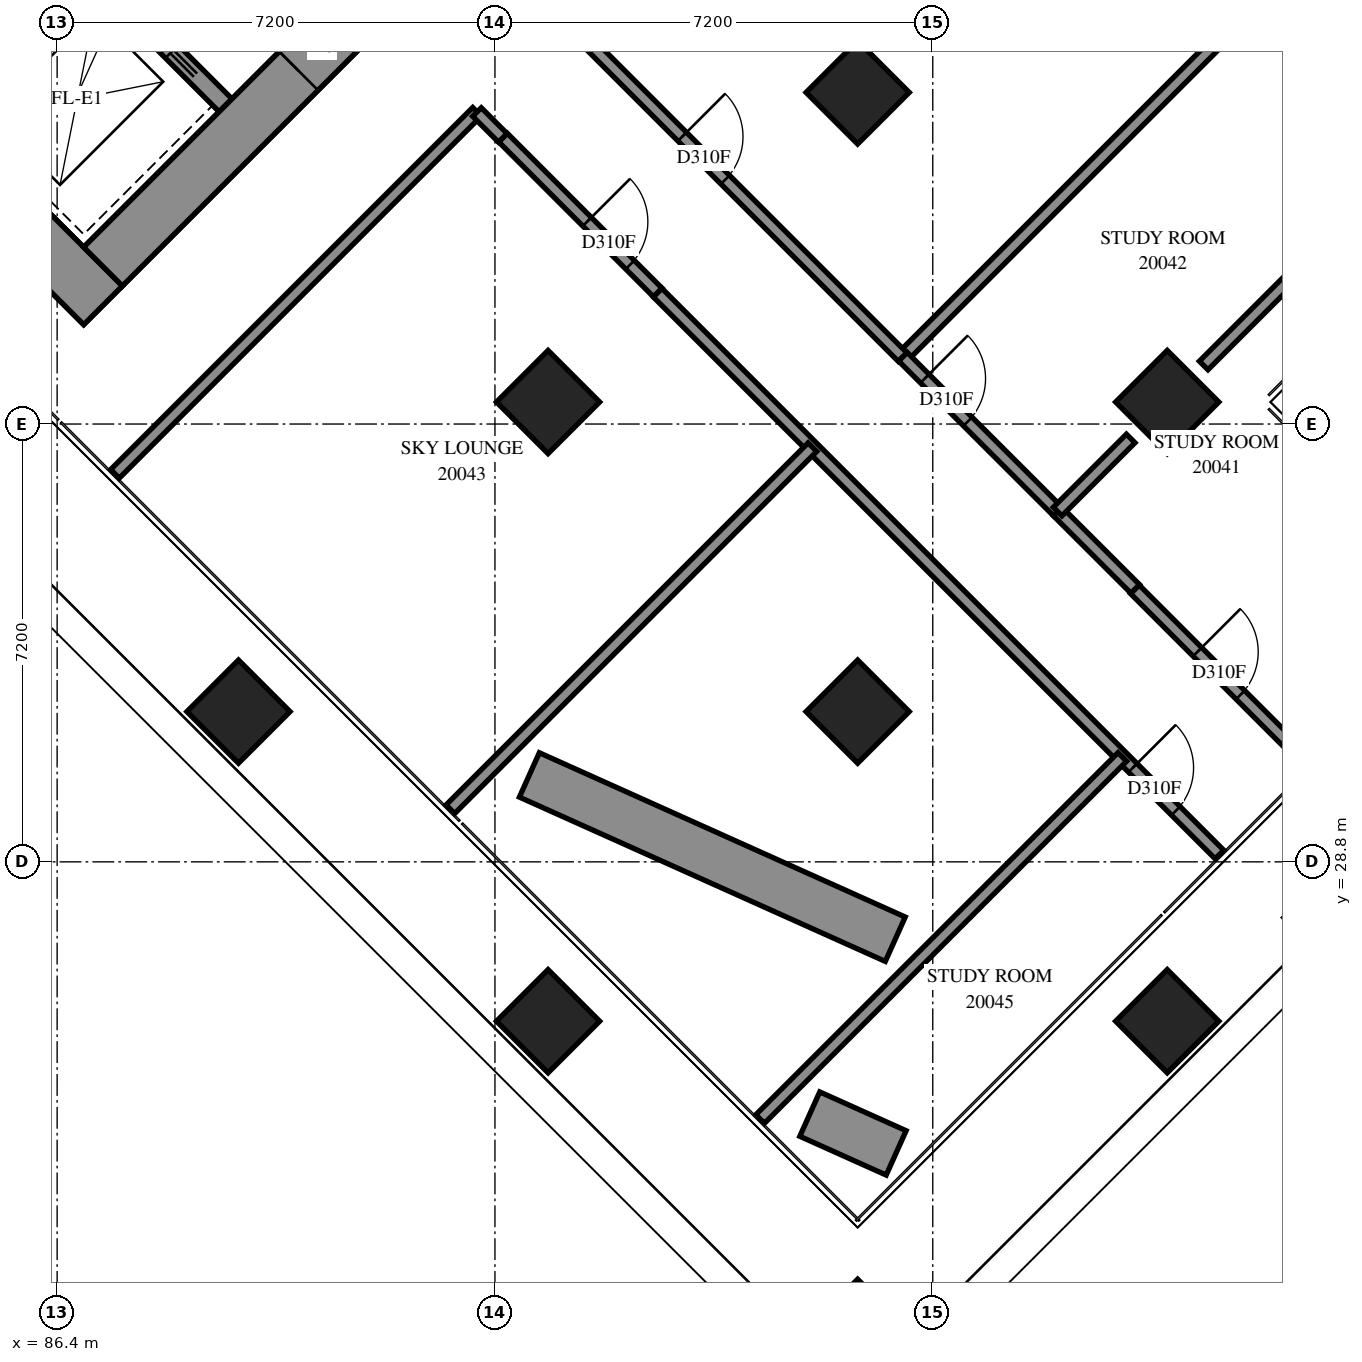
"""IFC4 building model, lengths in metres.
Left out: names, types, materials, properties, quantities, classifications, styles, units other than length and angle.
Written with IfcOpenShell. Run it as: python <this file> out.ifc"""

import sys

from ifc_helpers import new_model, si_unit, direction, frame, frame_2d, origin, origin_2d, place, context, subcontext, project, spatial, polyline, rectangle, outline, extrude, element, fill, save


model = new_model("IFC4")
c1 = context("Model", 3, precision=1e-05, world=origin(), true_north=direction((0.0, 1.0)))
c2 = subcontext(c1, "Body", "Model", "MODEL_VIEW")
j1 = project(units=[si_unit("LENGTHUNIT", "METRE"), si_unit("PLANEANGLEUNIT", "RADIAN")], contexts=[c1])
p1 = place(None, origin())
s1 = spatial("IfcSite", under=j1, at=p1, CompositionType="ELEMENT")
p2 = place(p1, origin())
s2 = spatial("IfcBuilding", under=s1, at=p2, CompositionType="ELEMENT")
p3 = place(p2, frame((0.0, 0.0, 77.0)))
s3 = spatial("IfcBuildingStorey", under=s2, at=p3, CompositionType="ELEMENT", Elevation=77.0)
for number, where, z_axis, x_axis in (
    (1, (99.565, 41.453, 0.0), (0.0, 0.0, 1.0), (0.707, -0.707, 0.0)),
    (2, (94.474, 36.362, 0.0), (0.0, 0.0, 1.0), (0.707, -0.707, 0.0)),
    (3, (89.382, 31.271, 0.0), (0.0, 0.0, 1.0), (0.707, -0.707, 0.0)),
    (4, (104.656, 36.362, 0.0), (0.0, 0.0, 1.0), (0.707, -0.707, 0.0)),
    (5, (99.565, 31.271, 0.0), (0.0, 0.0, 1.0), (0.707, -0.707, 0.0)),
    (6, (94.474, 26.18, 0.0), (0.0, 0.0, 1.0), (0.707, -0.707, 0.0)),
    (7, (104.656, 26.18, 0.0), (0.0, 0.0, 1.0), (0.707, -0.707, 0.0)),
    (8, (99.565, 21.088, 0.0), (0.0, 0.0, 1.0), (0.707, -0.707, 0.0)),
):
    element("IfcColumn", number, at=place(p3, frame(where, z_axis=z_axis, x_axis=x_axis)), inside=s3, PredefinedType="COLUMN", context=c2, shape_type="SweptSolid", body=[
        extrude(rectangle(XDim=1.2, YDim=1.2, at=origin_2d()), origin(), (0.0, 0.0, 1.0), 3.9),
    ])
p4 = place(p3, frame((75.7, 49.408, -0.3), z_axis=(0.0, 0.0, 1.0), x_axis=(0.7071098676, -0.7071036948, 0.0)))
e9 = element("IfcWall", 9, at=p4, inside=s3, PredefinedType="SHEAR", context=c2, shape_type="SweptSolid", body=[
    extrude(rectangle(XDim=16.2, YDim=0.9, at=frame_2d((8.1, 0.0))), origin(), (0.0, 0.0, 1.0), 3.5),
])
p5 = place(p3, frame((87.155, 38.589, -0.3), z_axis=(0.0, 0.0, 1.0), x_axis=(0.7071067812, 0.7071067812, 0.0)))
e10 = element("IfcWall", 10, at=p5, inside=s3, PredefinedType="SHEAR", context=c2, shape_type="SweptSolid", body=[
    extrude(rectangle(XDim=14.4, YDim=0.9, at=frame_2d((7.2, 0.0))), origin(), (0.0, 0.0, 1.0), 3.5),
])
p6 = place(p5, frame((4.55, 0.0, 0.3)))
e11 = element("IfcOpeningElement", 11, at=p6, cuts=e10, PredefinedType="OPENING", context=c2, shape_type="SweptSolid", body=[
    extrude(rectangle(XDim=1.1, YDim=2.1, at=frame_2d((0.55, 1.05))), frame((0.0, 0.46, 0.0), z_axis=(0.0, -1.0, 0.0), x_axis=(1.0, 0.0, 0.0)), (0.0, 0.0, 1.0), 0.92),
])
p7 = place(p5, frame((11.35, 0.0, 0.3)))
e12 = element("IfcOpeningElement", 12, at=p7, cuts=e10, PredefinedType="OPENING", context=c2, shape_type="SweptSolid", body=[
    extrude(rectangle(XDim=1.1, YDim=2.1, at=frame_2d((0.55, 1.05))), frame((0.0, 0.46, 0.0), z_axis=(0.0, -1.0, 0.0), x_axis=(1.0, 0.0, 0.0)), (0.0, 0.0, 1.0), 0.92),
])
p8 = place(p3, frame((84.291, 41.453, 0.0), z_axis=(0.0, 0.0, 1.0), x_axis=(0.7071067812, 0.7071067812, 0.0)))
e13 = element("IfcWall", 13, at=p8, inside=s3, PredefinedType="SOLIDWALL", context=c2, shape_type="SweptSolid", body=[
    extrude(rectangle(XDim=3.3, YDim=0.3, at=frame_2d((1.65, 0.0))), origin(), (0.0, 0.0, 1.0), 3.9),
])
p9 = place(p3, frame((78.988, 51.423, 0.0), z_axis=(0.0, 0.0, 1.0), x_axis=(0.7071067812, -0.7071067812, 0.0)))
e14 = element("IfcWall", 14, at=p9, inside=s3, PredefinedType="SOLIDWALL", context=c2, shape_type="SweptSolid", body=[
    extrude(rectangle(XDim=14.4, YDim=0.3, at=frame_2d((7.2, 0.0))), origin(), (0.0, 0.0, 1.0), 3.9),
])
p10 = place(p9, frame((1.25, 0.0, 0.0)))
e15 = element("IfcOpeningElement", 15, at=p10, cuts=e14, PredefinedType="OPENING", context=c2, shape_type="SweptSolid", body=[
    extrude(rectangle(XDim=1.1, YDim=2.1, at=frame_2d((0.55, 1.05))), frame((0.0, 0.16, 0.0), z_axis=(0.0, -1.0, 0.0), x_axis=(1.0, 0.0, 0.0)), (0.0, 0.0, 1.0), 0.32),
])
p11 = place(p9, frame((4.85, 0.0, 0.0)))
e16 = element("IfcOpeningElement", 16, at=p11, cuts=e14, PredefinedType="OPENING", context=c2, shape_type="SweptSolid", body=[
    extrude(rectangle(XDim=1.1, YDim=2.1, at=frame_2d((0.55, 1.05))), frame((0.0, 0.16, 0.0), z_axis=(0.0, -1.0, 0.0), x_axis=(1.0, 0.0, 0.0)), (0.0, 0.0, 1.0), 0.32),
])
p12 = place(p9, frame((8.45, 0.0, 0.0)))
e17 = element("IfcOpeningElement", 17, at=p12, cuts=e14, PredefinedType="OPENING", context=c2, shape_type="SweptSolid", body=[
    extrude(rectangle(XDim=1.1, YDim=2.1, at=frame_2d((0.55, 1.05))), frame((0.0, 0.16, 0.0), z_axis=(0.0, -1.0, 0.0), x_axis=(1.0, 0.0, 0.0)), (0.0, 0.0, 1.0), 0.32),
])
p13 = place(p9, frame((12.05, 0.0, 0.0)))
e18 = element("IfcOpeningElement", 18, at=p13, cuts=e14, PredefinedType="OPENING", context=c2, shape_type="SweptSolid", body=[
    extrude(rectangle(XDim=1.1, YDim=2.1, at=frame_2d((0.55, 1.05))), frame((0.0, 0.16, 0.0), z_axis=(0.0, -1.0, 0.0), x_axis=(1.0, 0.0, 0.0)), (0.0, 0.0, 1.0), 0.32),
])
p14 = place(p3, frame((100.183, 27.528, 0.0), z_axis=(0.0, 0.0, 1.0), x_axis=(-0.9122941569, 0.4095355556, 0.0)))
e19 = element("IfcWall", 19, at=p14, inside=s3, PredefinedType="SOLIDWALL", context=c2, shape_type="SweptSolid", body=[
    extrude(rectangle(XDim=6.596, YDim=0.8, at=frame_2d((3.298, 0.0))), origin(), (0.0, 0.0, 1.0), 0.65),
])
p15 = place(p3, frame((100.198, 24.014, 0.0), z_axis=(0.0, 0.0, 1.0), x_axis=(-0.9123091938, 0.4095020573, 0.0)))
e20 = element("IfcWall", 20, at=p15, inside=s3, PredefinedType="SOLIDWALL", context=c2, shape_type="SweptSolid", body=[
    extrude(rectangle(XDim=1.557, YDim=0.8, at=frame_2d((0.779, 0.0))), origin(), (0.0, 0.0, 1.0), 0.65),
])
p16 = place(p3, frame((96.274, 38.162, 0.0), z_axis=(0.0, 0.0, 1.0), x_axis=(0.7071067812, -0.7071067812, 0.0)))
e21 = element("IfcWall", 21, at=p16, inside=s3, PredefinedType="PARTITIONING", context=c2, shape_type="SweptSolid", body=[
    extrude(outline(polyline([(0.0, -0.1), (13.069, -0.1), (13.069, 0.1), (0.0, 0.1), (0.0, -0.1)])), origin(), (0.0, 0.0, 1.0), 3.9),
])
p17 = place(p16, frame((11.053, 0.0, 0.0)))
e22 = element("IfcOpeningElement", 22, at=p17, cuts=e21, PredefinedType="OPENING", context=c2, shape_type="SweptSolid", body=[
    extrude(rectangle(XDim=1.0, YDim=2.1, at=frame_2d((0.5, 1.05))), frame((0.0, 0.11, 0.0), z_axis=(0.0, -1.0, 0.0), x_axis=(1.0, 0.0, 0.0)), (0.0, 0.0, 1.0), 0.22),
])
p18 = place(p3, frame((97.961, 24.571, 0.0), z_axis=(0.0, 0.0, 1.0), x_axis=(0.7072255129, 0.7069880295, 0.0)))
e23 = element("IfcWall", 23, at=p18, inside=s3, PredefinedType="PARTITIONING", context=c2, shape_type="SweptSolid", body=[
    extrude(rectangle(XDim=8.422, YDim=0.2, at=frame_2d((4.211, 0.0))), origin(), (0.0, 0.0, 1.0), 3.9),
])
for number, where, z_axis, x_axis in (
    (24, (100.307, 37.105, 0.0), (0.0, 0.0, 1.0), (0.707, 0.707, 0.0)),
    (25, (92.867, 29.665, 0.0), (0.0, 0.0, 1.0), (0.707, 0.707, 0.0)),
    (26, (87.351, 35.181, 0.0), (0.0, 0.0, 1.0), (0.707, 0.707, 0.0)),
):
    element("IfcWall", number, at=place(p3, frame(where, z_axis=z_axis, x_axis=x_axis)), inside=s3, PredefinedType="PARTITIONING", context=c2, shape_type="SweptSolid", body=[
        extrude(rectangle(XDim=8.42, YDim=0.2, at=frame_2d((4.21, 0.0))), origin(), (0.0, 0.0, 1.0), 3.9),
    ])
p19 = place(p3, frame((94.788, 42.617, 0.0), z_axis=(0.0, 0.0, 1.0), x_axis=(0.7071067812, -0.7071067812, 0.0)))
e27 = element("IfcWall", 27, at=p19, inside=s3, PredefinedType="PARTITIONING", context=c2, shape_type="SweptSolid", body=[
    extrude(rectangle(XDim=7.801, YDim=0.2, at=frame_2d((3.9, 0.0))), origin(), (0.0, 0.0, 1.0), 3.9),
])
p20 = place(p19, frame((2.674, 0.0, 0.0)))
e28 = element("IfcOpeningElement", 28, at=p20, cuts=e27, PredefinedType="OPENING", context=c2, shape_type="SweptSolid", body=[
    extrude(rectangle(XDim=1.0, YDim=2.1, at=frame_2d((0.5, 1.05))), frame((0.0, 0.11, 0.0), z_axis=(0.0, -1.0, 0.0), x_axis=(1.0, 0.0, 0.0)), (0.0, 0.0, 1.0), 0.22),
])
p21 = place(p3, frame((105.255, 36.963, 0.0), z_axis=(0.0, 0.0, 1.0), x_axis=(0.7071067812, 0.7071067812, 0.0)))
e29 = element("IfcWall", 29, at=p21, inside=s3, PredefinedType="PARTITIONING", context=c2, shape_type="SweptSolid", body=[
    extrude(rectangle(XDim=5.021, YDim=0.2, at=frame_2d((2.51, 0.0))), origin(), (0.0, 0.0, 1.0), 3.9),
])
p22 = place(p3, frame((104.123, 33.282, 0.0), z_axis=(0.0, 0.0, 1.0), x_axis=(0.7071067812, -0.7071067812, 0.0)))
e30 = element("IfcWall", 30, at=p22, inside=s3, PredefinedType="PARTITIONING", context=c2, shape_type="SweptSolid", body=[
    extrude(rectangle(XDim=4.07, YDim=0.2, at=frame_2d((2.035, 0.0))), origin(), (0.0, 0.0, 1.0), 3.9),
])
p23 = place(p22, frame((1.456, 0.0, 0.0)))
e31 = element("IfcOpeningElement", 31, at=p23, cuts=e30, PredefinedType="OPENING", context=c2, shape_type="SweptSolid", body=[
    extrude(rectangle(XDim=1.0, YDim=2.1, at=frame_2d((0.5, 1.05))), frame((0.0, 0.11, 0.0), z_axis=(0.0, -1.0, 0.0), x_axis=(1.0, 0.0, 0.0)), (0.0, 0.0, 1.0), 0.22),
])
p24 = place(p3, frame((93.732, 40.71, 0.0), z_axis=(0.0, 0.0, 1.0), x_axis=(0.7068288851, -0.7073845681, 0.0)))
e32 = element("IfcWall", 32, at=p24, inside=s3, PredefinedType="PARTITIONING", context=c2, shape_type="SweptSolid", body=[
    extrude(rectangle(XDim=3.599, YDim=0.2, at=frame_2d((1.8, 0.0))), origin(), (0.0, 0.0, 1.0), 3.9),
])
p25 = place(p24, frame((1.956, 0.0, 0.0)))
e33 = element("IfcOpeningElement", 33, at=p25, cuts=e32, PredefinedType="OPENING", context=c2, shape_type="SweptSolid", body=[
    extrude(rectangle(XDim=1.0, YDim=2.1, at=frame_2d((0.5, 1.05))), frame((0.0, 0.11, 0.0), z_axis=(0.0, -1.0, 0.0), x_axis=(1.0, 0.0, 0.0)), (0.0, 0.0, 1.0), 0.22),
])
p26 = place(p3, frame((100.31, 37.106, 0.0), z_axis=(0.0, 0.0, 1.0), x_axis=(0.7073845681, -0.7068288851, 0.0)))
e34 = element("IfcWall", 34, at=p26, inside=s3, PredefinedType="PARTITIONING", context=c2, shape_type="SweptSolid", body=[
    extrude(rectangle(XDim=3.599, YDim=0.2, at=frame_2d((1.8, 0.0))), origin(), (0.0, 0.0, 1.0), 3.9),
])
p27 = place(p26, frame((0.507, 0.0, 0.0)))
e35 = element("IfcOpeningElement", 35, at=p27, cuts=e34, PredefinedType="OPENING", context=c2, shape_type="SweptSolid", body=[
    extrude(rectangle(XDim=1.0, YDim=2.1, at=frame_2d((0.5, 1.05))), frame((0.0, 0.11, 0.0), z_axis=(0.0, -1.0, 0.0), x_axis=(1.0, 0.0, 0.0)), (0.0, 0.0, 1.0), 0.22),
])
p28 = place(p3, frame((102.855, 34.561, 0.0), z_axis=(0.0, 0.0, 1.0), x_axis=(0.7076620277, -0.7065510983, 0.0)))
e36 = element("IfcWall", 36, at=p28, inside=s3, PredefinedType="PARTITIONING", context=c2, shape_type="SweptSolid", body=[
    extrude(rectangle(XDim=1.8, YDim=0.2, at=frame_2d((0.9, 0.0))), origin(), (0.0, 0.0, 1.0), 3.9),
])
p29 = place(p3, frame((102.853, 34.561, 0.0), z_axis=(0.0, 0.0, 1.0), x_axis=(0.7071067812, 0.7071067812, 0.0)))
e37 = element("IfcWall", 37, at=p29, inside=s3, PredefinedType="PARTITIONING", context=c2, shape_type="SweptSolid", body=[
    extrude(rectangle(XDim=1.7, YDim=0.2, at=frame_2d((0.85, 0.0))), origin(), (0.0, 0.0, 1.0), 3.9),
])
p30 = place(p3, frame((93.305, 41.131, 0.0), z_axis=(0.0, 0.0, 1.0), x_axis=(0.7071067812, -0.7071067812, 0.0)))
e38 = element("IfcWall", 38, at=p30, inside=s3, PredefinedType="PARTITIONING", context=c2, shape_type="SweptSolid", body=[
    extrude(rectangle(XDim=0.6, YDim=0.2, at=frame_2d((0.3, 0.0))), origin(), (0.0, 0.0, 1.0), 3.9),
])
p31 = place(p6, origin())
e39 = element("IfcDoor", 39, at=p31, inside=s3, OperationType="DOUBLE_DOOR_SINGLE_SWING", PredefinedType="DOOR", context=c2, shape_type="SweptSolid", body=[
    extrude(rectangle(XDim=1.1, YDim=2.1, at=frame_2d((0.55, 1.05))), frame((0.0, 0.025, 0.0), z_axis=(0.0, -1.0, 0.0), x_axis=(1.0, 0.0, 0.0)), (0.0, 0.0, 1.0), 0.05),
])
fill(e11, e39)
p32 = place(p20, origin())
e40 = element("IfcDoor", 40, at=p32, inside=s3, OperationType="SINGLE_SWING_RIGHT", PredefinedType="DOOR", context=c2, shape_type="SweptSolid", body=[
    extrude(rectangle(XDim=1.0, YDim=2.1, at=frame_2d((0.5, 1.05))), frame((0.0, 0.025, 0.0), z_axis=(0.0, -1.0, 0.0), x_axis=(1.0, 0.0, 0.0)), (0.0, 0.0, 1.0), 0.05),
])
fill(e28, e40)
p33 = place(p23, origin())
e41 = element("IfcDoor", 41, at=p33, inside=s3, OperationType="SINGLE_SWING_LEFT", PredefinedType="DOOR", context=c2, shape_type="SweptSolid", body=[
    extrude(rectangle(XDim=1.0, YDim=2.1, at=frame_2d((0.5, 1.05))), frame((0.0, 0.025, 0.0), z_axis=(0.0, -1.0, 0.0), x_axis=(1.0, 0.0, 0.0)), (0.0, 0.0, 1.0), 0.05),
])
fill(e31, e41)
p34 = place(p27, origin())
e42 = element("IfcDoor", 42, at=p34, inside=s3, OperationType="SINGLE_SWING_RIGHT", PredefinedType="DOOR", context=c2, shape_type="SweptSolid", body=[
    extrude(rectangle(XDim=1.0, YDim=2.1, at=frame_2d((0.5, 1.05))), frame((0.0, 0.025, 0.0), z_axis=(0.0, -1.0, 0.0), x_axis=(1.0, 0.0, 0.0)), (0.0, 0.0, 1.0), 0.05),
])
fill(e35, e42)
p35 = place(p25, origin())
e43 = element("IfcDoor", 43, at=p35, inside=s3, OperationType="SINGLE_SWING_LEFT", PredefinedType="DOOR", context=c2, shape_type="SweptSolid", body=[
    extrude(rectangle(XDim=1.0, YDim=2.1, at=frame_2d((0.5, 1.05))), frame((0.0, 0.025, 0.0), z_axis=(0.0, -1.0, 0.0), x_axis=(1.0, 0.0, 0.0)), (0.0, 0.0, 1.0), 0.05),
])
fill(e33, e43)
p36 = place(p17, origin())
e44 = element("IfcDoor", 44, at=p36, inside=s3, OperationType="SINGLE_SWING_LEFT", PredefinedType="DOOR", context=c2, shape_type="SweptSolid", body=[
    extrude(rectangle(XDim=1.0, YDim=2.1, at=frame_2d((0.5, 1.05))), frame((0.0, 0.025, 0.0), z_axis=(0.0, -1.0, 0.0), x_axis=(1.0, 0.0, 0.0)), (0.0, 0.0, 1.0), 0.05),
])
fill(e22, e44)
save(model, sys.argv[1])
